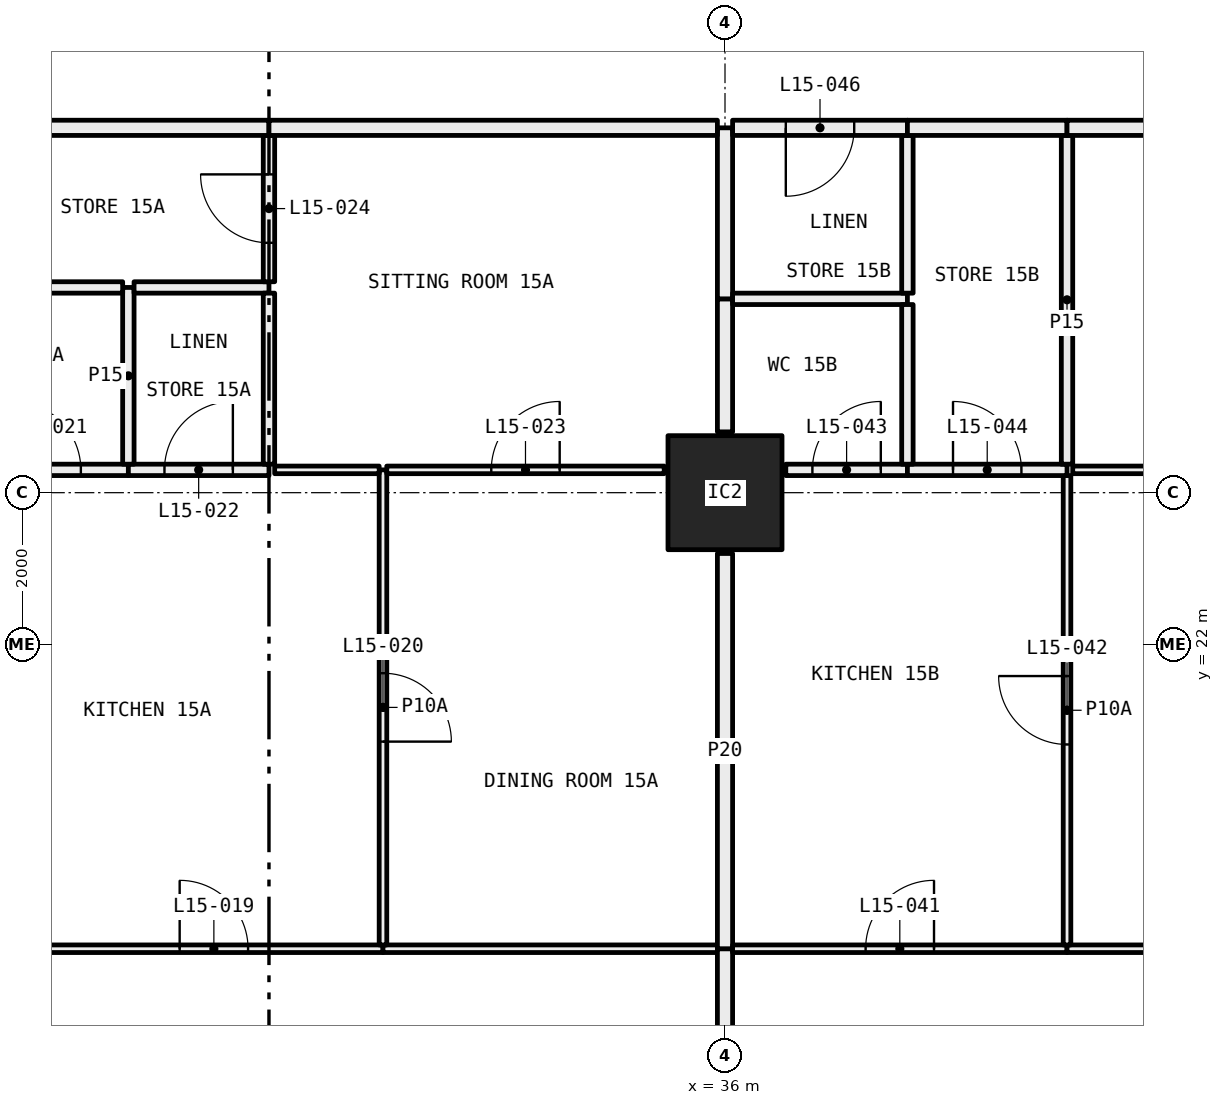
"""IFC4 building model, lengths in metres.
Left out: names, types, materials, properties, quantities, classifications, styles, units other than length and angle.
Written with IfcOpenShell. Run it as: python <this file> out.ifc"""

import sys

from ifc_helpers import new_model, si_unit, direction, frame, frame_2d, origin, origin_2d, place, context, subcontext, project, spatial, rectangle, hollow_rectangle, extrude, element, fill, save


model = new_model("IFC4")
c1 = context("Model", 3, precision=1e-05, world=origin(), true_north=direction((0.0, 1.0)))
c2 = subcontext(c1, "Body", "Model", "MODEL_VIEW")
j1 = project(units=[si_unit("LENGTHUNIT", "METRE"), si_unit("PLANEANGLEUNIT", "RADIAN")], contexts=[c1])
p1 = place(None, origin())
s1 = spatial("IfcSite", under=j1, at=p1, CompositionType="ELEMENT")
p2 = place(p1, origin())
s2 = spatial("IfcBuilding", under=s1, at=p2, CompositionType="ELEMENT")
p3 = place(p2, frame((0.0, 0.0, 64.5)))
s3 = spatial("IfcBuildingStorey", under=s2, at=p3, CompositionType="ELEMENT", Elevation=64.5)
p4 = place(p3, frame((36.0, 24.0, 0.0), z_axis=(0.0, 0.0, 1.0), x_axis=(1.0, 0.0, 0.0)))
e1 = element("IfcColumn", 1, at=p4, inside=s3, PredefinedType="COLUMN", context=c2, shape_type="SweptSolid", body=[
    extrude(hollow_rectangle(XDim=1.5, YDim=1.5, WallThickness=0.065, at=origin_2d()), origin(), (0.0, 0.0, 1.0), 3.05),
])
p5 = place(p3, frame((31.5, 18.0, 0.0), z_axis=(0.0, 0.0, 1.0), x_axis=(-1.0, 0.0, 0.0)))
e2 = element("IfcWall", 2, at=p5, inside=s3, PredefinedType="PARTITIONING", context=c2, shape_type="SweptSolid", body=[
    extrude(rectangle(XDim=4.45, YDim=0.1, at=frame_2d((2.225, 0.0))), origin(), (0.0, 0.0, 1.0), 3.05),
])
p6 = place(p5, frame((1.775, 0.0, 0.0)))
e3 = element("IfcOpeningElement", 3, at=p6, cuts=e2, PredefinedType="OPENING", context=c2, shape_type="SweptSolid", body=[
    extrude(rectangle(XDim=0.9, YDim=2.1, at=frame_2d((0.45, 1.05))), frame((0.0, 0.06, 0.0), z_axis=(0.0, -1.0, 0.0), x_axis=(1.0, 0.0, 0.0)), (0.0, 0.0, 1.0), 0.12),
])
p7 = place(p3, frame((35.9, 18.0, 0.0), z_axis=(0.0, 0.0, 1.0), x_axis=(-1.0, 0.0, 0.0)))
e4 = element("IfcWall", 4, at=p7, inside=s3, PredefinedType="PARTITIONING", context=c2, shape_type="SweptSolid", body=[
    extrude(rectangle(XDim=4.4, YDim=0.1, at=frame_2d((2.2, 0.0))), origin(), (0.0, 0.0, 1.0), 3.05),
])
p8 = place(p3, frame((36.0, 12.8, 0.0), z_axis=(0.0, 0.0, 1.0), x_axis=(0.0, 1.0, 0.0)))
e5 = element("IfcWall", 5, at=p8, inside=s3, PredefinedType="PARTITIONING", context=c2, shape_type="SweptSolid", body=[
    extrude(rectangle(XDim=5.2, YDim=0.2, at=frame_2d((2.6, 0.0))), origin(), (0.0, 0.0, 1.0), 2.45),
])
p9 = place(p3, frame((31.5, 18.05, 0.0), z_axis=(0.0, 0.0, 1.0), x_axis=(0.0, 1.0, 0.0)))
e6 = element("IfcWall", 6, at=p9, inside=s3, PredefinedType="PARTITIONING", context=c2, shape_type="SweptSolid", body=[
    extrude(rectangle(XDim=6.25, YDim=0.1, at=frame_2d((3.125, 0.0))), origin(), (0.0, 0.0, 1.0), 2.45),
])
p10 = place(p9, frame((2.675, 0.0, 0.0)))
e7 = element("IfcOpeningElement", 7, at=p10, cuts=e6, PredefinedType="OPENING", context=c2, shape_type="SweptSolid", body=[
    extrude(rectangle(XDim=0.9, YDim=2.1, at=frame_2d((0.45, 1.05))), frame((0.0, 0.06, 0.0), z_axis=(0.0, -1.0, 0.0), x_axis=(1.0, 0.0, 0.0)), (0.0, 0.0, 1.0), 0.12),
])
p11 = place(p3, frame((28.15, 24.3, 0.0), z_axis=(0.0, 0.0, 1.0), x_axis=(-1.0, 0.0, 0.0)))
e8 = element("IfcWall", 8, at=p11, inside=s3, PredefinedType="PARTITIONING", context=c2, shape_type="SweptSolid", body=[
    extrude(rectangle(XDim=2.15, YDim=0.15, at=frame_2d((1.075, 0.0))), origin(), (0.0, 0.0, 1.0), 3.05),
])
p12 = place(p11, frame((0.625, 0.0, 0.0)))
e9 = element("IfcOpeningElement", 9, at=p12, cuts=e8, PredefinedType="OPENING", context=c2, shape_type="SweptSolid", body=[
    extrude(rectangle(XDim=0.9, YDim=2.1, at=frame_2d((0.45, 1.05))), frame((0.0, 0.085, 0.0), z_axis=(0.0, -1.0, 0.0), x_axis=(1.0, 0.0, 0.0)), (0.0, 0.0, 1.0), 0.17),
])
p13 = place(p3, frame((30.0, 24.3, 0.0), z_axis=(0.0, 0.0, 1.0), x_axis=(-1.0, 0.0, 0.0)))
e10 = element("IfcWall", 10, at=p13, inside=s3, PredefinedType="PARTITIONING", context=c2, shape_type="SweptSolid", body=[
    extrude(rectangle(XDim=1.85, YDim=0.15, at=frame_2d((0.925, 0.0))), origin(), (0.0, 0.0, 1.0), 3.05),
])
p14 = place(p13, frame((0.475, 0.0, 0.0)))
e11 = element("IfcOpeningElement", 11, at=p14, cuts=e10, PredefinedType="OPENING", context=c2, shape_type="SweptSolid", body=[
    extrude(rectangle(XDim=0.9, YDim=2.1, at=frame_2d((0.45, 1.05))), frame((0.0, 0.085, 0.0), z_axis=(0.0, -1.0, 0.0), x_axis=(1.0, 0.0, 0.0)), (0.0, 0.0, 1.0), 0.17),
])
p15 = place(p3, frame((31.45, 24.3, 0.0), z_axis=(0.0, 0.0, 1.0), x_axis=(-1.0, 0.0, 0.0)))
e12 = element("IfcWall", 12, at=p15, inside=s3, PredefinedType="PARTITIONING", context=c2, shape_type="SweptSolid", body=[
    extrude(rectangle(XDim=1.375, YDim=0.1, at=frame_2d((0.688, 0.0))), origin(), (0.0, 0.0, 1.0), 3.05),
])
p16 = place(p3, frame((35.2, 24.3, 0.0), z_axis=(0.0, 0.0, 1.0), x_axis=(-1.0, 0.0, 0.0)))
e13 = element("IfcWall", 13, at=p16, inside=s3, PredefinedType="PARTITIONING", context=c2, shape_type="SweptSolid", body=[
    extrude(rectangle(XDim=3.65, YDim=0.1, at=frame_2d((1.825, 0.0))), origin(), (0.0, 0.0, 1.0), 3.05),
])
p17 = place(p16, frame((1.375, 0.0, 0.0)))
e14 = element("IfcOpeningElement", 14, at=p17, cuts=e13, PredefinedType="OPENING", context=c2, shape_type="SweptSolid", body=[
    extrude(rectangle(XDim=0.9, YDim=2.1, at=frame_2d((0.45, 1.05))), frame((0.0, 0.06, 0.0), z_axis=(0.0, -1.0, 0.0), x_axis=(1.0, 0.0, 0.0)), (0.0, 0.0, 1.0), 0.12),
])
p18 = place(p3, frame((36.0, 18.0, 0.0), z_axis=(0.0, 0.0, 1.0), x_axis=(0.0, 1.0, 0.0)))
e15 = element("IfcWall", 15, at=p18, inside=s3, PredefinedType="PARTITIONING", context=c2, shape_type="SweptSolid", body=[
    extrude(rectangle(XDim=5.2, YDim=0.2, at=frame_2d((2.6, 0.0))), origin(), (0.0, 0.0, 1.0), 2.45),
])
p19 = place(p3, frame((28.15, 24.375, 0.0), z_axis=(0.0, 0.0, 1.0), x_axis=(0.0, 1.0, 0.0)))
e16 = element("IfcWall", 16, at=p19, inside=s3, PredefinedType="PARTITIONING", context=c2, shape_type="SweptSolid", body=[
    extrude(rectangle(XDim=2.325, YDim=0.15, at=frame_2d((1.163, 0.0))), origin(), (0.0, 0.0, 1.0), 3.05),
])
p20 = place(p3, frame((28.075, 26.7, 0.0), z_axis=(0.0, 0.0, 1.0), x_axis=(-1.0, 0.0, 0.0)))
e17 = element("IfcWall", 17, at=p20, inside=s3, PredefinedType="PARTITIONING", context=c2, shape_type="SweptSolid", body=[
    extrude(rectangle(XDim=2.075, YDim=0.15, at=frame_2d((1.038, 0.0))), origin(), (0.0, 0.0, 1.0), 3.05),
])
p21 = place(p3, frame((30.0, 26.7, 0.0), z_axis=(0.0, 0.0, 1.0), x_axis=(-1.0, 0.0, 0.0)))
e18 = element("IfcWall", 18, at=p21, inside=s3, PredefinedType="PARTITIONING", context=c2, shape_type="SweptSolid", body=[
    extrude(rectangle(XDim=1.775, YDim=0.15, at=frame_2d((0.887, 0.0))), origin(), (0.0, 0.0, 1.0), 3.05),
])
p22 = place(p3, frame((30.0, 24.375, 0.0), z_axis=(0.0, 0.0, 1.0), x_axis=(0.0, 1.0, 0.0)))
e19 = element("IfcWall", 19, at=p22, inside=s3, PredefinedType="PARTITIONING", context=c2, shape_type="SweptSolid", body=[
    extrude(rectangle(XDim=2.25, YDim=0.15, at=frame_2d((1.125, 0.0))), origin(), (0.0, 0.0, 1.0), 3.05),
])
p23 = place(p3, frame((30.0, 26.775, 0.0), z_axis=(0.0, 0.0, 1.0), x_axis=(0.0, 1.0, 0.0)))
e20 = element("IfcWall", 20, at=p23, inside=s3, PredefinedType="PARTITIONING", context=c2, shape_type="SweptSolid", body=[
    extrude(rectangle(XDim=1.925, YDim=0.15, at=frame_2d((0.962, 0.0))), origin(), (0.0, 0.0, 1.0), 3.05),
])
p24 = place(p23, frame((0.512, 0.0, 0.0)))
e21 = element("IfcOpeningElement", 21, at=p24, cuts=e20, PredefinedType="OPENING", context=c2, shape_type="SweptSolid", body=[
    extrude(rectangle(XDim=0.9, YDim=2.1, at=frame_2d((0.45, 1.05))), frame((0.0, 0.085, 0.0), z_axis=(0.0, -1.0, 0.0), x_axis=(1.0, 0.0, 0.0)), (0.0, 0.0, 1.0), 0.17),
])
p25 = place(p3, frame((30.0, 28.8, 0.0), z_axis=(0.0, 0.0, 1.0), x_axis=(-1.0, 0.0, 0.0)))
e22 = element("IfcWall", 22, at=p25, inside=s3, PredefinedType="PARTITIONING", context=c2, shape_type="SweptSolid", body=[
    extrude(rectangle(XDim=4.1, YDim=0.2, at=frame_2d((2.05, 0.0))), origin(), (0.0, 0.0, 1.0), 3.05),
])
p26 = place(p3, frame((36.0, 24.8, 0.0), z_axis=(0.0, 0.0, 1.0), x_axis=(0.0, 1.0, 0.0)))
e23 = element("IfcWall", 23, at=p26, inside=s3, PredefinedType="PARTITIONING", context=c2, shape_type="SweptSolid", body=[
    extrude(rectangle(XDim=1.75, YDim=0.2, at=frame_2d((0.875, 0.0))), origin(), (0.0, 0.0, 1.0), 2.45),
])
p27 = place(p3, frame((36.0, 26.55, 0.0), z_axis=(0.0, 0.0, 1.0), x_axis=(0.0, 1.0, 0.0)))
e24 = element("IfcWall", 24, at=p27, inside=s3, PredefinedType="PARTITIONING", context=c2, shape_type="SweptSolid", body=[
    extrude(rectangle(XDim=2.25, YDim=0.2, at=frame_2d((1.125, 0.0))), origin(), (0.0, 0.0, 1.0), 2.45),
])
p28 = place(p3, frame((35.9, 28.8, 0.0), z_axis=(0.0, 0.0, 1.0), x_axis=(-1.0, 0.0, 0.0)))
e25 = element("IfcWall", 25, at=p28, inside=s3, PredefinedType="PARTITIONING", context=c2, shape_type="SweptSolid", body=[
    extrude(rectangle(XDim=5.9, YDim=0.2, at=frame_2d((2.95, 0.0))), origin(), (0.0, 0.0, 1.0), 3.05),
])
p29 = place(p3, frame((40.5, 18.0, 0.0), z_axis=(0.0, 0.0, 1.0), x_axis=(-1.0, 0.0, 0.0)))
e26 = element("IfcWall", 26, at=p29, inside=s3, PredefinedType="PARTITIONING", context=c2, shape_type="SweptSolid", body=[
    extrude(rectangle(XDim=4.4, YDim=0.1, at=frame_2d((2.2, 0.0))), origin(), (0.0, 0.0, 1.0), 3.05),
])
p30 = place(p29, frame((1.75, 0.0, 0.0)))
e27 = element("IfcOpeningElement", 27, at=p30, cuts=e26, PredefinedType="OPENING", context=c2, shape_type="SweptSolid", body=[
    extrude(rectangle(XDim=0.9, YDim=2.1, at=frame_2d((0.45, 1.05))), frame((0.0, 0.06, 0.0), z_axis=(0.0, -1.0, 0.0), x_axis=(1.0, 0.0, 0.0)), (0.0, 0.0, 1.0), 0.12),
])
p31 = place(p3, frame((41.95, 18.0, 0.0), z_axis=(0.0, 0.0, 1.0), x_axis=(-1.0, 0.0, 0.0)))
e28 = element("IfcWall", 28, at=p31, inside=s3, PredefinedType="PARTITIONING", context=c2, shape_type="SweptSolid", body=[
    extrude(rectangle(XDim=1.45, YDim=0.1, at=frame_2d((0.725, 0.0))), origin(), (0.0, 0.0, 1.0), 3.05),
])
p32 = place(p3, frame((40.5, 18.05, 0.0), z_axis=(0.0, 0.0, 1.0), x_axis=(0.0, 1.0, 0.0)))
e29 = element("IfcWall", 29, at=p32, inside=s3, PredefinedType="PARTITIONING", context=c2, shape_type="SweptSolid", body=[
    extrude(rectangle(XDim=6.175, YDim=0.1, at=frame_2d((3.087, 0.0))), origin(), (0.0, 0.0, 1.0), 2.45),
])
p33 = place(p32, frame((2.637, 0.0, 0.0)))
e30 = element("IfcOpeningElement", 30, at=p33, cuts=e29, PredefinedType="OPENING", context=c2, shape_type="SweptSolid", body=[
    extrude(rectangle(XDim=0.9, YDim=2.1, at=frame_2d((0.45, 1.05))), frame((0.0, 0.06, 0.0), z_axis=(0.0, -1.0, 0.0), x_axis=(1.0, 0.0, 0.0)), (0.0, 0.0, 1.0), 0.12),
])
p34 = place(p3, frame((38.4, 24.3, 0.0), z_axis=(0.0, 0.0, 1.0), x_axis=(-1.0, 0.0, 0.0)))
e31 = element("IfcWall", 31, at=p34, inside=s3, PredefinedType="PARTITIONING", context=c2, shape_type="SweptSolid", body=[
    extrude(rectangle(XDim=1.6, YDim=0.15, at=frame_2d((0.8, 0.0))), origin(), (0.0, 0.0, 1.0), 3.05),
])
p35 = place(p34, frame((0.35, 0.0, 0.0)))
e32 = element("IfcOpeningElement", 32, at=p35, cuts=e31, PredefinedType="OPENING", context=c2, shape_type="SweptSolid", body=[
    extrude(rectangle(XDim=0.9, YDim=2.1, at=frame_2d((0.45, 1.05))), frame((0.0, 0.085, 0.0), z_axis=(0.0, -1.0, 0.0), x_axis=(1.0, 0.0, 0.0)), (0.0, 0.0, 1.0), 0.17),
])
p36 = place(p3, frame((40.5, 24.3, 0.0), z_axis=(0.0, 0.0, 1.0), x_axis=(-1.0, 0.0, 0.0)))
e33 = element("IfcWall", 33, at=p36, inside=s3, PredefinedType="PARTITIONING", context=c2, shape_type="SweptSolid", body=[
    extrude(rectangle(XDim=2.1, YDim=0.15, at=frame_2d((1.05, 0.0))), origin(), (0.0, 0.0, 1.0), 3.05),
])
p37 = place(p36, frame((0.6, 0.0, 0.0)))
e34 = element("IfcOpeningElement", 34, at=p37, cuts=e33, PredefinedType="OPENING", context=c2, shape_type="SweptSolid", body=[
    extrude(rectangle(XDim=0.9, YDim=2.1, at=frame_2d((0.45, 1.05))), frame((0.0, 0.085, 0.0), z_axis=(0.0, -1.0, 0.0), x_axis=(1.0, 0.0, 0.0)), (0.0, 0.0, 1.0), 0.17),
])
p38 = place(p3, frame((46.0, 24.3, 0.0), z_axis=(0.0, 0.0, 1.0), x_axis=(-1.0, 0.0, 0.0)))
e35 = element("IfcWall", 35, at=p38, inside=s3, PredefinedType="PARTITIONING", context=c2, shape_type="SweptSolid", body=[
    extrude(rectangle(XDim=5.425, YDim=0.1, at=frame_2d((2.712, 0.0))), origin(), (0.0, 0.0, 1.0), 3.05),
])
p39 = place(p38, frame((2.262, 0.0, 0.0)))
e36 = element("IfcOpeningElement", 36, at=p39, cuts=e35, PredefinedType="OPENING", context=c2, shape_type="SweptSolid", body=[
    extrude(rectangle(XDim=0.9, YDim=2.1, at=frame_2d((0.45, 1.05))), frame((0.0, 0.06, 0.0), z_axis=(0.0, -1.0, 0.0), x_axis=(1.0, 0.0, 0.0)), (0.0, 0.0, 1.0), 0.12),
])
p40 = place(p3, frame((38.4, 26.55, 0.0), z_axis=(0.0, 0.0, 1.0), x_axis=(-1.0, 0.0, 0.0)))
e37 = element("IfcWall", 37, at=p40, inside=s3, PredefinedType="PARTITIONING", context=c2, shape_type="SweptSolid", body=[
    extrude(rectangle(XDim=2.3, YDim=0.15, at=frame_2d((1.15, 0.0))), origin(), (0.0, 0.0, 1.0), 3.05),
])
p41 = place(p3, frame((38.4, 24.375, 0.0), z_axis=(0.0, 0.0, 1.0), x_axis=(0.0, 1.0, 0.0)))
e38 = element("IfcWall", 38, at=p41, inside=s3, PredefinedType="PARTITIONING", context=c2, shape_type="SweptSolid", body=[
    extrude(rectangle(XDim=2.1, YDim=0.15, at=frame_2d((1.05, 0.0))), origin(), (0.0, 0.0, 1.0), 3.05),
])
p42 = place(p3, frame((38.4, 26.625, 0.0), z_axis=(0.0, 0.0, 1.0), x_axis=(0.0, 1.0, 0.0)))
e39 = element("IfcWall", 39, at=p42, inside=s3, PredefinedType="PARTITIONING", context=c2, shape_type="SweptSolid", body=[
    extrude(rectangle(XDim=2.075, YDim=0.15, at=frame_2d((1.038, 0.0))), origin(), (0.0, 0.0, 1.0), 3.05),
])
p43 = place(p3, frame((38.4, 28.8, 0.0), z_axis=(0.0, 0.0, 1.0), x_axis=(-1.0, 0.0, 0.0)))
e40 = element("IfcWall", 40, at=p43, inside=s3, PredefinedType="PARTITIONING", context=c2, shape_type="SweptSolid", body=[
    extrude(rectangle(XDim=2.3, YDim=0.2, at=frame_2d((1.15, 0.0))), origin(), (0.0, 0.0, 1.0), 3.05),
])
p44 = place(p43, frame((0.7, 0.0, 0.0)))
e41 = element("IfcOpeningElement", 41, at=p44, cuts=e40, PredefinedType="OPENING", context=c2, shape_type="SweptSolid", body=[
    extrude(rectangle(XDim=0.9, YDim=2.1, at=frame_2d((0.45, 1.05))), frame((0.0, 0.11, 0.0), z_axis=(0.0, -1.0, 0.0), x_axis=(1.0, 0.0, 0.0)), (0.0, 0.0, 1.0), 0.22),
])
p45 = place(p3, frame((40.5, 24.375, 0.0), z_axis=(0.0, 0.0, 1.0), x_axis=(0.0, 1.0, 0.0)))
e42 = element("IfcWall", 42, at=p45, inside=s3, PredefinedType="PARTITIONING", context=c2, shape_type="SweptSolid", body=[
    extrude(rectangle(XDim=4.325, YDim=0.15, at=frame_2d((2.163, 0.0))), origin(), (0.0, 0.0, 1.0), 3.05),
])
p46 = place(p3, frame((40.5, 28.8, 0.0), z_axis=(0.0, 0.0, 1.0), x_axis=(-1.0, 0.0, 0.0)))
e43 = element("IfcWall", 43, at=p46, inside=s3, PredefinedType="PARTITIONING", context=c2, shape_type="SweptSolid", body=[
    extrude(rectangle(XDim=2.1, YDim=0.2, at=frame_2d((1.05, 0.0))), origin(), (0.0, 0.0, 1.0), 3.05),
])
p47 = place(p3, frame((46.0, 28.8, 0.0), z_axis=(0.0, 0.0, 1.0), x_axis=(-1.0, 0.0, 0.0)))
e44 = element("IfcWall", 44, at=p47, inside=s3, PredefinedType="PARTITIONING", context=c2, shape_type="SweptSolid", body=[
    extrude(rectangle(XDim=5.5, YDim=0.2, at=frame_2d((2.75, 0.0))), origin(), (0.0, 0.0, 1.0), 3.05),
])
p48 = place(p6, frame((0.9, 0.0, 0.0), x_axis=(-1.0, 0.0, 0.0)))
e45 = element("IfcDoor", 45, at=p48, inside=s3, OperationType="SINGLE_SWING_RIGHT", PredefinedType="DOOR", context=c2, shape_type="SweptSolid", body=[
    extrude(rectangle(XDim=0.9, YDim=2.1, at=frame_2d((0.45, 1.05))), frame((0.0, 0.025, 0.0), z_axis=(0.0, -1.0, 0.0), x_axis=(1.0, 0.0, 0.0)), (0.0, 0.0, 1.0), 0.05),
])
fill(e3, e45)
p49 = place(p10, frame((0.9, 0.0, 0.0), x_axis=(-1.0, 0.0, 0.0)))
e46 = element("IfcDoor", 46, at=p49, inside=s3, OperationType="SINGLE_SWING_LEFT", PredefinedType="DOOR", context=c2, shape_type="SweptSolid", body=[
    extrude(rectangle(XDim=0.9, YDim=2.1, at=frame_2d((0.45, 1.05))), frame((0.0, 0.025, 0.0), z_axis=(0.0, -1.0, 0.0), x_axis=(1.0, 0.0, 0.0)), (0.0, 0.0, 1.0), 0.05),
])
fill(e7, e46)
p50 = place(p12, frame((0.9, 0.0, 0.0), x_axis=(-1.0, 0.0, 0.0)))
e47 = element("IfcDoor", 47, at=p50, inside=s3, OperationType="SINGLE_SWING_RIGHT", PredefinedType="DOOR", context=c2, shape_type="SweptSolid", body=[
    extrude(rectangle(XDim=0.9, YDim=2.1, at=frame_2d((0.45, 1.05))), frame((0.0, 0.025, 0.0), z_axis=(0.0, -1.0, 0.0), x_axis=(1.0, 0.0, 0.0)), (0.0, 0.0, 1.0), 0.05),
])
fill(e9, e47)
p51 = place(p14, frame((0.9, 0.0, 0.0), x_axis=(-1.0, 0.0, 0.0)))
e48 = element("IfcDoor", 48, at=p51, inside=s3, OperationType="SINGLE_SWING_LEFT", PredefinedType="DOOR", context=c2, shape_type="SweptSolid", body=[
    extrude(rectangle(XDim=0.9, YDim=2.1, at=frame_2d((0.45, 1.05))), frame((0.0, 0.025, 0.0), z_axis=(0.0, -1.0, 0.0), x_axis=(1.0, 0.0, 0.0)), (0.0, 0.0, 1.0), 0.05),
])
fill(e11, e48)
p52 = place(p17, frame((0.9, 0.0, 0.0), x_axis=(-1.0, 0.0, 0.0)))
e49 = element("IfcDoor", 49, at=p52, inside=s3, OperationType="SINGLE_SWING_LEFT", PredefinedType="DOOR", context=c2, shape_type="SweptSolid", body=[
    extrude(rectangle(XDim=0.9, YDim=2.1, at=frame_2d((0.45, 1.05))), frame((0.0, 0.025, 0.0), z_axis=(0.0, -1.0, 0.0), x_axis=(1.0, 0.0, 0.0)), (0.0, 0.0, 1.0), 0.05),
])
fill(e14, e49)
p53 = place(p24, origin())
e50 = element("IfcDoor", 50, at=p53, inside=s3, OperationType="SINGLE_SWING_LEFT", PredefinedType="DOOR", context=c2, shape_type="SweptSolid", body=[
    extrude(rectangle(XDim=0.9, YDim=2.1, at=frame_2d((0.45, 1.05))), frame((0.0, 0.025, 0.0), z_axis=(0.0, -1.0, 0.0), x_axis=(1.0, 0.0, 0.0)), (0.0, 0.0, 1.0), 0.05),
])
fill(e21, e50)
p54 = place(p30, frame((0.9, 0.0, 0.0), x_axis=(-1.0, 0.0, 0.0)))
e51 = element("IfcDoor", 51, at=p54, inside=s3, OperationType="SINGLE_SWING_LEFT", PredefinedType="DOOR", context=c2, shape_type="SweptSolid", body=[
    extrude(rectangle(XDim=0.9, YDim=2.1, at=frame_2d((0.45, 1.05))), frame((0.0, 0.025, 0.0), z_axis=(0.0, -1.0, 0.0), x_axis=(1.0, 0.0, 0.0)), (0.0, 0.0, 1.0), 0.05),
])
fill(e27, e51)
p55 = place(p33, origin())
e52 = element("IfcDoor", 52, at=p55, inside=s3, OperationType="SINGLE_SWING_LEFT", PredefinedType="DOOR", context=c2, shape_type="SweptSolid", body=[
    extrude(rectangle(XDim=0.9, YDim=2.1, at=frame_2d((0.45, 1.05))), frame((0.0, 0.025, 0.0), z_axis=(0.0, -1.0, 0.0), x_axis=(1.0, 0.0, 0.0)), (0.0, 0.0, 1.0), 0.05),
])
fill(e30, e52)
p56 = place(p35, frame((0.9, 0.0, 0.0), x_axis=(-1.0, 0.0, 0.0)))
e53 = element("IfcDoor", 53, at=p56, inside=s3, OperationType="SINGLE_SWING_LEFT", PredefinedType="DOOR", context=c2, shape_type="SweptSolid", body=[
    extrude(rectangle(XDim=0.9, YDim=2.1, at=frame_2d((0.45, 1.05))), frame((0.0, 0.025, 0.0), z_axis=(0.0, -1.0, 0.0), x_axis=(1.0, 0.0, 0.0)), (0.0, 0.0, 1.0), 0.05),
])
fill(e32, e53)
p57 = place(p37, frame((0.9, 0.0, 0.0), x_axis=(-1.0, 0.0, 0.0)))
e54 = element("IfcDoor", 54, at=p57, inside=s3, OperationType="SINGLE_SWING_RIGHT", PredefinedType="DOOR", context=c2, shape_type="SweptSolid", body=[
    extrude(rectangle(XDim=0.9, YDim=2.1, at=frame_2d((0.45, 1.05))), frame((0.0, 0.025, 0.0), z_axis=(0.0, -1.0, 0.0), x_axis=(1.0, 0.0, 0.0)), (0.0, 0.0, 1.0), 0.05),
])
fill(e34, e54)
p58 = place(p44, origin())
e55 = element("IfcDoor", 55, at=p58, inside=s3, OperationType="SINGLE_SWING_LEFT", PredefinedType="DOOR", context=c2, shape_type="SweptSolid", body=[
    extrude(rectangle(XDim=0.9, YDim=2.1, at=frame_2d((0.45, 1.05))), frame((0.0, 0.025, 0.0), z_axis=(0.0, -1.0, 0.0), x_axis=(1.0, 0.0, 0.0)), (0.0, 0.0, 1.0), 0.05),
])
fill(e41, e55)
save(model, sys.argv[1])
